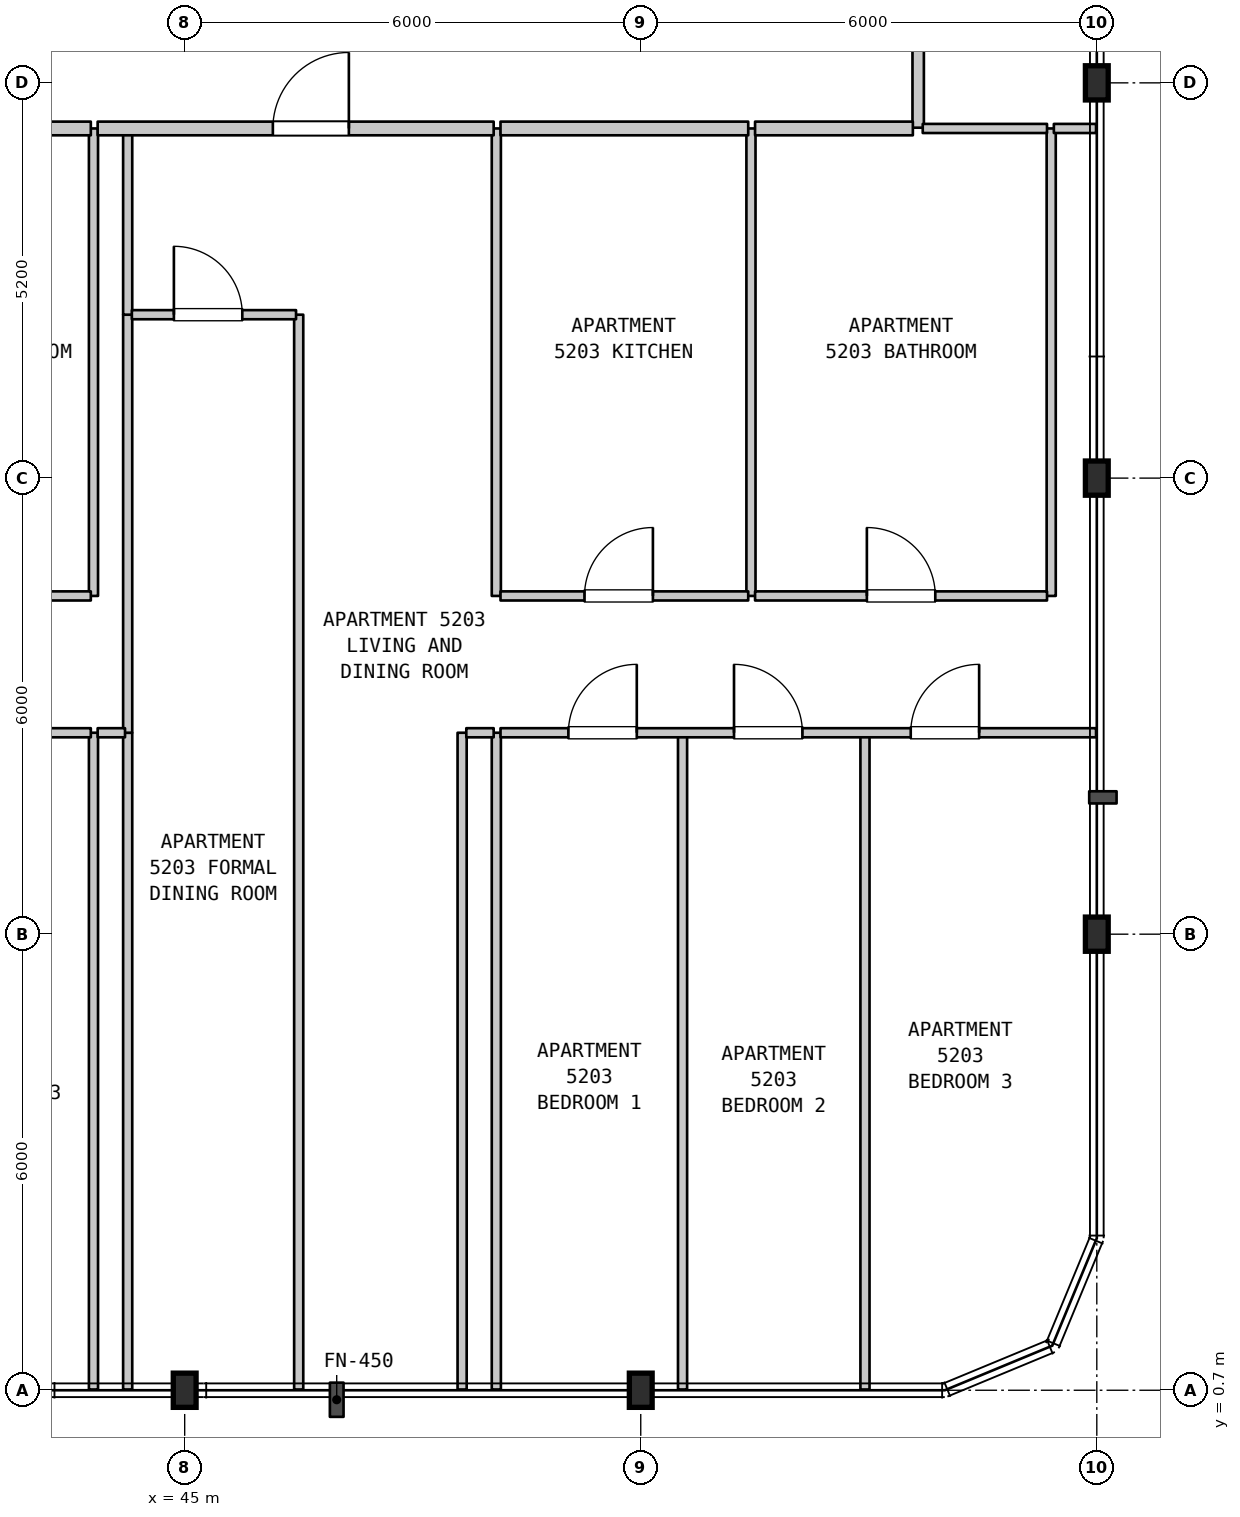
"""IFC4 building model, lengths in metres.
Left out: names, types, materials, properties, quantities, classifications, styles, units other than length and angle.
Written with IfcOpenShell. Run it as: python <this file> out.ifc"""

import sys

from ifc_helpers import new_model, si_unit, direction, frame, frame_2d, origin, origin_2d, place, context, subcontext, project, spatial, rectangle, i_section, extrude, element, fill, save


model = new_model("IFC4")
c1 = context("Model", 3, precision=1e-05, world=origin(), true_north=direction((0.0, 1.0)))
c2 = subcontext(c1, "Body", "Model", "MODEL_VIEW")
j1 = project(units=[si_unit("LENGTHUNIT", "METRE"), si_unit("PLANEANGLEUNIT", "RADIAN")], contexts=[c1])
p1 = place(None, origin())
s1 = spatial("IfcSite", under=j1, at=p1, CompositionType="ELEMENT")
p2 = place(p1, origin())
s2 = spatial("IfcBuilding", under=s1, at=p2, CompositionType="ELEMENT")
p3 = place(p2, frame((0.0, 0.0, 210.6)))
s3 = spatial("IfcBuildingStorey", under=s2, at=p3, CompositionType="ELEMENT", Elevation=210.6)
for number, where, z_axis, x_axis in (
    (1, (45.0, 0.7, 0.0), (0.0, 0.0, 1.0), (1.0, 0.0, 0.0)),
    (2, (51.0, 0.7, 0.0), (0.0, 0.0, 1.0), (1.0, 0.0, 0.0)),
    (3, (57.0, 6.7, 0.0), (0.0, 0.0, 1.0), (1.0, 0.0, 0.0)),
    (4, (57.0, 12.7, 0.0), (0.0, 0.0, 1.0), (1.0, 0.0, 0.0)),
    (5, (57.0, 17.9, 0.0), (0.0, 0.0, 1.0), (1.0, 0.0, 0.0)),
):
    element("IfcColumn", number, at=place(p3, frame(where, z_axis=z_axis, x_axis=x_axis)), inside=s3, PredefinedType="COLUMN", context=c2, shape_type="SweptSolid", body=[
        extrude(i_section(OverallWidth=0.3, OverallDepth=0.45, WebThickness=0.014, FlangeThickness=0.026, FilletRadius=0.027, at=origin_2d()), origin(), (0.0, 0.0, 1.0), 3.7),
    ])
p4 = place(p3, frame((43.8, 0.71, 0.0), z_axis=(0.0, 0.0, 1.0), x_axis=(0.0, 1.0, 0.0)))
e6 = element("IfcWall", 6, at=p4, inside=s3, PredefinedType="PARTITIONING", context=c2, shape_type="SweptSolid", body=[
    extrude(rectangle(XDim=8.64, YDim=0.12, at=frame_2d((4.32, 0.0))), origin(), (0.0, 0.0, 1.0), 3.39),
])
p5 = place(p3, frame((43.8, 11.15, 0.0), z_axis=(0.0, 0.0, 1.0), x_axis=(0.0, 1.0, 0.0)))
e7 = element("IfcWall", 7, at=p5, inside=s3, PredefinedType="PARTITIONING", context=c2, shape_type="SweptSolid", body=[
    extrude(rectangle(XDim=6.15, YDim=0.12, at=frame_2d((3.075, 0.0))), origin(), (0.0, 0.0, 1.0), 3.39),
])
p6 = place(p3, frame((44.25, 0.71, 0.0), z_axis=(0.0, 0.0, 1.0), x_axis=(0.0, 1.0, 0.0)))
e8 = element("IfcWall", 8, at=p6, inside=s3, PredefinedType="PARTITIONING", context=c2, shape_type="SweptSolid", body=[
    extrude(rectangle(XDim=8.64, YDim=0.12, at=frame_2d((4.32, 0.0))), origin(), (0.0, 0.0, 1.0), 3.39),
])
p7 = place(p3, frame((44.25, 9.35, 0.0), z_axis=(0.0, 0.0, 1.0), x_axis=(0.0, 1.0, 0.0)))
e9 = element("IfcWall", 9, at=p7, inside=s3, PredefinedType="PARTITIONING", context=c2, shape_type="SweptSolid", body=[
    extrude(rectangle(XDim=5.5, YDim=0.12, at=frame_2d((2.75, 0.0))), origin(), (0.0, 0.0, 1.0), 3.39),
])
p8 = place(p3, frame((44.25, 14.85, 0.0), z_axis=(0.0, 0.0, 1.0), x_axis=(0.0, 1.0, 0.0)))
e10 = element("IfcWall", 10, at=p8, inside=s3, PredefinedType="PARTITIONING", context=c2, shape_type="SweptSolid", body=[
    extrude(rectangle(XDim=2.45, YDim=0.12, at=frame_2d((1.225, 0.0))), origin(), (0.0, 0.0, 1.0), 3.39),
])
p9 = place(p3, frame((46.5, 0.71, 0.0), z_axis=(0.0, 0.0, 1.0), x_axis=(0.0, 1.0, 0.0)))
e11 = element("IfcWall", 11, at=p9, inside=s3, PredefinedType="PARTITIONING", context=c2, shape_type="SweptSolid", body=[
    extrude(rectangle(XDim=14.14, YDim=0.12, at=frame_2d((7.07, 0.0))), origin(), (0.0, 0.0, 1.0), 3.39),
])
for number, where, z_axis, x_axis in (
    (12, (48.65, 0.71, 0.0), (0.0, 0.0, 1.0), (0.0, 1.0, 0.0)),
    (13, (49.1, 0.71, 0.0), (0.0, 0.0, 1.0), (0.0, 1.0, 0.0)),
):
    element("IfcWall", number, at=place(p3, frame(where, z_axis=z_axis, x_axis=x_axis)), inside=s3, PredefinedType="PARTITIONING", context=c2, shape_type="SweptSolid", body=[
        extrude(rectangle(XDim=8.64, YDim=0.12, at=frame_2d((4.32, 0.0))), origin(), (0.0, 0.0, 1.0), 3.39),
    ])
p10 = place(p3, frame((49.1, 11.15, 0.0), z_axis=(0.0, 0.0, 1.0), x_axis=(0.0, 1.0, 0.0)))
e14 = element("IfcWall", 14, at=p10, inside=s3, PredefinedType="PARTITIONING", context=c2, shape_type="SweptSolid", body=[
    extrude(rectangle(XDim=6.15, YDim=0.12, at=frame_2d((3.075, 0.0))), origin(), (0.0, 0.0, 1.0), 3.39),
])
p11 = place(p3, frame((51.55, 0.71, 0.0), z_axis=(0.0, 0.0, 1.0), x_axis=(0.0, 1.0, 0.0)))
e15 = element("IfcWall", 15, at=p11, inside=s3, PredefinedType="PARTITIONING", context=c2, shape_type="SweptSolid", body=[
    extrude(rectangle(XDim=8.64, YDim=0.12, at=frame_2d((4.32, 0.0))), origin(), (0.0, 0.0, 1.0), 3.39),
])
p12 = place(p3, frame((52.45, 11.15, 0.0), z_axis=(0.0, 0.0, 1.0), x_axis=(0.0, 1.0, 0.0)))
e16 = element("IfcWall", 16, at=p12, inside=s3, PredefinedType="PARTITIONING", context=c2, shape_type="SweptSolid", body=[
    extrude(rectangle(XDim=6.15, YDim=0.12, at=frame_2d((3.075, 0.0))), origin(), (0.0, 0.0, 1.0), 3.39),
])
p13 = place(p3, frame((53.95, 0.71, 0.0), z_axis=(0.0, 0.0, 1.0), x_axis=(0.0, 1.0, 0.0)))
e17 = element("IfcWall", 17, at=p13, inside=s3, PredefinedType="PARTITIONING", context=c2, shape_type="SweptSolid", body=[
    extrude(rectangle(XDim=8.64, YDim=0.12, at=frame_2d((4.32, 0.0))), origin(), (0.0, 0.0, 1.0), 3.39),
])
p14 = place(p3, frame((54.65, 17.31, 0.0), z_axis=(0.0, 0.0, 1.0), x_axis=(0.0, 1.0, 0.0)))
e18 = element("IfcWall", 18, at=p14, inside=s3, PredefinedType="STANDARD", context=c2, shape_type="SweptSolid", body=[
    extrude(rectangle(XDim=2.19, YDim=0.15, at=frame_2d((1.095, 0.0))), origin(), (0.0, 0.0, 1.0), 3.39),
])
p15 = place(p3, frame((56.4, 11.15, 0.0), z_axis=(0.0, 0.0, 1.0), x_axis=(0.0, 1.0, 0.0)))
e19 = element("IfcWall", 19, at=p15, inside=s3, PredefinedType="PARTITIONING", context=c2, shape_type="SweptSolid", body=[
    extrude(rectangle(XDim=6.15, YDim=0.12, at=frame_2d((3.075, 0.0))), origin(), (0.0, 0.0, 1.0), 3.39),
])
p16 = place(p3, frame((34.795, 9.35, 0.0), z_axis=(0.0, 0.0, 1.0), x_axis=(1.0, 0.0, 0.0)))
e20 = element("IfcWall", 20, at=p16, inside=s3, PredefinedType="PARTITIONING", context=c2, shape_type="SweptSolid", body=[
    extrude(rectangle(XDim=8.97, YDim=0.12, at=frame_2d((4.485, 0.0))), origin(), (0.0, 0.0, 1.0), 3.39),
])
p17 = place(p16, frame((1.119, 0.0, 0.0)))
e21 = element("IfcOpeningElement", 21, at=p17, cuts=e20, PredefinedType="OPENING", context=c2, shape_type="SweptSolid", body=[
    extrude(rectangle(XDim=0.9, YDim=2.15, at=frame_2d((0.45, 1.075))), frame((0.0, 0.07, 0.0), z_axis=(0.0, -1.0, 0.0), x_axis=(1.0, 0.0, 0.0)), (0.0, 0.0, 1.0), 0.14),
])
p18 = place(p16, frame((3.962, 0.0, 0.0)))
e22 = element("IfcOpeningElement", 22, at=p18, cuts=e20, PredefinedType="OPENING", context=c2, shape_type="SweptSolid", body=[
    extrude(rectangle(XDim=0.9, YDim=2.15, at=frame_2d((0.45, 1.075))), frame((0.0, 0.07, 0.0), z_axis=(0.0, -1.0, 0.0), x_axis=(1.0, 0.0, 0.0)), (0.0, 0.0, 1.0), 0.14),
])
p19 = place(p16, frame((6.809, 0.0, 0.0)))
e23 = element("IfcOpeningElement", 23, at=p19, cuts=e20, PredefinedType="OPENING", context=c2, shape_type="SweptSolid", body=[
    extrude(rectangle(XDim=0.9, YDim=2.15, at=frame_2d((0.45, 1.075))), frame((0.0, 0.07, 0.0), z_axis=(0.0, -1.0, 0.0), x_axis=(1.0, 0.0, 0.0)), (0.0, 0.0, 1.0), 0.14),
])
p20 = place(p3, frame((43.855, 9.35, 0.0), z_axis=(0.0, 0.0, 1.0), x_axis=(1.0, 0.0, 0.0)))
e24 = element("IfcWall", 24, at=p20, inside=s3, PredefinedType="PARTITIONING", context=c2, shape_type="SweptSolid", body=[
    extrude(rectangle(XDim=0.36, YDim=0.12, at=frame_2d((0.18, 0.0))), origin(), (0.0, 0.0, 1.0), 3.39),
])
p21 = place(p3, frame((48.705, 9.35, 0.0), z_axis=(0.0, 0.0, 1.0), x_axis=(1.0, 0.0, 0.0)))
e25 = element("IfcWall", 25, at=p21, inside=s3, PredefinedType="PARTITIONING", context=c2, shape_type="SweptSolid", body=[
    extrude(rectangle(XDim=0.36, YDim=0.12, at=frame_2d((0.18, 0.0))), origin(), (0.0, 0.0, 1.0), 3.39),
])
p22 = place(p3, frame((49.155, 9.35, 0.0), z_axis=(0.0, 0.0, 1.0), x_axis=(1.0, 0.0, 0.0)))
e26 = element("IfcWall", 26, at=p22, inside=s3, PredefinedType="PARTITIONING", context=c2, shape_type="SweptSolid", body=[
    extrude(rectangle(XDim=7.835, YDim=0.12, at=frame_2d((3.917, 0.0))), origin(), (0.0, 0.0, 1.0), 3.39),
])
p23 = place(p22, frame((0.893, 0.0, 0.0)))
e27 = element("IfcOpeningElement", 27, at=p23, cuts=e26, PredefinedType="OPENING", context=c2, shape_type="SweptSolid", body=[
    extrude(rectangle(XDim=0.9, YDim=2.15, at=frame_2d((0.45, 1.075))), frame((0.0, 0.07, 0.0), z_axis=(0.0, -1.0, 0.0), x_axis=(1.0, 0.0, 0.0)), (0.0, 0.0, 1.0), 0.14),
])
p24 = place(p22, frame((3.072, 0.0, 0.0)))
e28 = element("IfcOpeningElement", 28, at=p24, cuts=e26, PredefinedType="OPENING", context=c2, shape_type="SweptSolid", body=[
    extrude(rectangle(XDim=0.9, YDim=2.15, at=frame_2d((0.45, 1.075))), frame((0.0, 0.07, 0.0), z_axis=(0.0, -1.0, 0.0), x_axis=(1.0, 0.0, 0.0)), (0.0, 0.0, 1.0), 0.14),
])
p25 = place(p22, frame((5.397, 0.0, 0.0)))
e29 = element("IfcOpeningElement", 29, at=p25, cuts=e26, PredefinedType="OPENING", context=c2, shape_type="SweptSolid", body=[
    extrude(rectangle(XDim=0.9, YDim=2.15, at=frame_2d((0.45, 1.075))), frame((0.0, 0.07, 0.0), z_axis=(0.0, -1.0, 0.0), x_axis=(1.0, 0.0, 0.0)), (0.0, 0.0, 1.0), 0.14),
])
p26 = place(p3, frame((41.318, 11.15, 0.0), z_axis=(0.0, 0.0, 1.0), x_axis=(1.0, 0.0, 0.0)))
e30 = element("IfcWall", 30, at=p26, inside=s3, PredefinedType="PARTITIONING", context=c2, shape_type="SweptSolid", body=[
    extrude(rectangle(XDim=2.447, YDim=0.12, at=frame_2d((1.223, 0.0))), origin(), (0.0, 0.0, 1.0), 3.39),
])
p27 = place(p26, frame((0.774, 0.0, 0.0)))
e31 = element("IfcOpeningElement", 31, at=p27, cuts=e30, PredefinedType="OPENING", context=c2, shape_type="SweptSolid", body=[
    extrude(rectangle(XDim=0.9, YDim=2.1, at=frame_2d((0.45, 1.05))), frame((0.0, 0.07, 0.0), z_axis=(0.0, -1.0, 0.0), x_axis=(1.0, 0.0, 0.0)), (0.0, 0.0, 1.0), 0.14),
])
p28 = place(p3, frame((49.155, 11.15, 0.0), z_axis=(0.0, 0.0, 1.0), x_axis=(1.0, 0.0, 0.0)))
e32 = element("IfcWall", 32, at=p28, inside=s3, PredefinedType="PARTITIONING", context=c2, shape_type="SweptSolid", body=[
    extrude(rectangle(XDim=3.259, YDim=0.12, at=frame_2d((1.629, 0.0))), origin(), (0.0, 0.0, 1.0), 3.39),
])
p29 = place(p28, frame((1.105, 0.0, 0.0)))
e33 = element("IfcOpeningElement", 33, at=p29, cuts=e32, PredefinedType="OPENING", context=c2, shape_type="SweptSolid", body=[
    extrude(rectangle(XDim=0.9, YDim=2.15, at=frame_2d((0.45, 1.075))), frame((0.0, 0.07, 0.0), z_axis=(0.0, -1.0, 0.0), x_axis=(1.0, 0.0, 0.0)), (0.0, 0.0, 1.0), 0.14),
])
p30 = place(p3, frame((52.504, 11.15, 0.0), z_axis=(0.0, 0.0, 1.0), x_axis=(1.0, 0.0, 0.0)))
e34 = element("IfcWall", 34, at=p30, inside=s3, PredefinedType="PARTITIONING", context=c2, shape_type="SweptSolid", body=[
    extrude(rectangle(XDim=3.841, YDim=0.12, at=frame_2d((1.92, 0.0))), origin(), (0.0, 0.0, 1.0), 3.39),
])
p31 = place(p30, frame((1.471, 0.0, 0.0)))
e35 = element("IfcOpeningElement", 35, at=p31, cuts=e34, PredefinedType="OPENING", context=c2, shape_type="SweptSolid", body=[
    extrude(rectangle(XDim=0.9, YDim=2.1, at=frame_2d((0.45, 1.05))), frame((0.0, 0.07, 0.0), z_axis=(0.0, -1.0, 0.0), x_axis=(1.0, 0.0, 0.0)), (0.0, 0.0, 1.0), 0.14),
])
p32 = place(p3, frame((44.305, 14.85, 0.0), z_axis=(0.0, 0.0, 1.0), x_axis=(1.0, 0.0, 0.0)))
e36 = element("IfcWall", 36, at=p32, inside=s3, PredefinedType="PARTITIONING", context=c2, shape_type="SweptSolid", body=[
    extrude(rectangle(XDim=2.16, YDim=0.12, at=frame_2d((1.08, 0.0))), origin(), (0.0, 0.0, 1.0), 3.39),
])
p33 = place(p32, frame((0.553, 0.0, 0.0)))
e37 = element("IfcOpeningElement", 37, at=p33, cuts=e36, PredefinedType="OPENING", context=c2, shape_type="SweptSolid", body=[
    extrude(rectangle(XDim=0.9, YDim=2.15, at=frame_2d((0.45, 1.075))), frame((0.0, 0.07, 0.0), z_axis=(0.0, -1.0, 0.0), x_axis=(1.0, 0.0, 0.0)), (0.0, 0.0, 1.0), 0.14),
])
p34 = place(p3, frame((41.318, 17.3, 0.0), z_axis=(0.0, 0.0, 1.0), x_axis=(1.0, 0.0, 0.0)))
e38 = element("IfcWall", 38, at=p34, inside=s3, PredefinedType="STANDARD", context=c2, shape_type="SweptSolid", body=[
    extrude(rectangle(XDim=2.447, YDim=0.18, at=frame_2d((1.223, 0.0))), origin(), (0.0, 0.0, 1.0), 3.39),
])
p35 = place(p3, frame((43.855, 17.3, 0.0), z_axis=(0.0, 0.0, 1.0), x_axis=(1.0, 0.0, 0.0)))
e39 = element("IfcWall", 39, at=p35, inside=s3, PredefinedType="STANDARD", context=c2, shape_type="SweptSolid", body=[
    extrude(rectangle(XDim=5.21, YDim=0.18, at=frame_2d((2.605, 0.0))), origin(), (0.0, 0.0, 1.0), 3.39),
])
p36 = place(p35, frame((2.305, 0.0, 0.0)))
e40 = element("IfcOpeningElement", 40, at=p36, cuts=e39, PredefinedType="OPENING", context=c2, shape_type="SweptSolid", body=[
    extrude(rectangle(XDim=1.0, YDim=2.15, at=frame_2d((0.5, 1.075))), frame((0.0, 0.1, 0.0), z_axis=(0.0, -1.0, 0.0), x_axis=(1.0, 0.0, 0.0)), (0.0, 0.0, 1.0), 0.2),
])
p37 = place(p3, frame((49.155, 17.3, 0.0), z_axis=(0.0, 0.0, 1.0), x_axis=(1.0, 0.0, 0.0)))
e41 = element("IfcWall", 41, at=p37, inside=s3, PredefinedType="STANDARD", context=c2, shape_type="SweptSolid", body=[
    extrude(rectangle(XDim=3.259, YDim=0.18, at=frame_2d((1.629, 0.0))), origin(), (0.0, 0.0, 1.0), 3.39),
])
p38 = place(p3, frame((52.504, 17.3, 0.0), z_axis=(0.0, 0.0, 1.0), x_axis=(1.0, 0.0, 0.0)))
e42 = element("IfcWall", 42, at=p38, inside=s3, PredefinedType="STANDARD", context=c2, shape_type="SweptSolid", body=[
    extrude(rectangle(XDim=2.076, YDim=0.18, at=frame_2d((1.038, 0.0))), origin(), (0.0, 0.0, 1.0), 3.39),
])
p39 = place(p3, frame((54.71, 17.3, 0.0), z_axis=(0.0, 0.0, 1.0), x_axis=(1.0, 0.0, 0.0)))
e43 = element("IfcWall", 43, at=p39, inside=s3, PredefinedType="PARTITIONING", context=c2, shape_type="SweptSolid", body=[
    extrude(rectangle(XDim=1.635, YDim=0.12, at=frame_2d((0.817, 0.0))), origin(), (0.0, 0.0, 1.0), 3.39),
])
p40 = place(p3, frame((56.435, 17.3, 0.0), z_axis=(0.0, 0.0, 1.0), x_axis=(1.0, 0.0, 0.0)))
e44 = element("IfcWall", 44, at=p40, inside=s3, PredefinedType="PARTITIONING", context=c2, shape_type="SweptSolid", body=[
    extrude(rectangle(XDim=0.555, YDim=0.12, at=frame_2d((0.277, 0.0))), origin(), (0.0, 0.0, 1.0), 3.39),
])
p41 = place(p23, origin())
e45 = element("IfcDoor", 45, at=p41, inside=s3, OperationType="SINGLE_SWING_RIGHT", PredefinedType="DOOR", context=c2, shape_type="SweptSolid", body=[
    extrude(rectangle(XDim=0.9, YDim=2.15, at=frame_2d((0.45, 1.075))), frame((0.0, 0.025, 0.0), z_axis=(0.0, -1.0, 0.0), x_axis=(1.0, 0.0, 0.0)), (0.0, 0.0, 1.0), 0.05),
])
fill(e27, e45)
p42 = place(p24, origin())
e46 = element("IfcDoor", 46, at=p42, inside=s3, OperationType="SINGLE_SWING_LEFT", PredefinedType="DOOR", context=c2, shape_type="SweptSolid", body=[
    extrude(rectangle(XDim=0.9, YDim=2.15, at=frame_2d((0.45, 1.075))), frame((0.0, 0.025, 0.0), z_axis=(0.0, -1.0, 0.0), x_axis=(1.0, 0.0, 0.0)), (0.0, 0.0, 1.0), 0.05),
])
fill(e28, e46)
p43 = place(p25, origin())
e47 = element("IfcDoor", 47, at=p43, inside=s3, OperationType="SINGLE_SWING_RIGHT", PredefinedType="DOOR", context=c2, shape_type="SweptSolid", body=[
    extrude(rectangle(XDim=0.9, YDim=2.15, at=frame_2d((0.45, 1.075))), frame((0.0, 0.025, 0.0), z_axis=(0.0, -1.0, 0.0), x_axis=(1.0, 0.0, 0.0)), (0.0, 0.0, 1.0), 0.05),
])
fill(e29, e47)
p44 = place(p29, origin())
e48 = element("IfcDoor", 48, at=p44, inside=s3, OperationType="SINGLE_SWING_RIGHT", PredefinedType="DOOR", context=c2, shape_type="SweptSolid", body=[
    extrude(rectangle(XDim=0.9, YDim=2.15, at=frame_2d((0.45, 1.075))), frame((0.0, 0.025, 0.0), z_axis=(0.0, -1.0, 0.0), x_axis=(1.0, 0.0, 0.0)), (0.0, 0.0, 1.0), 0.05),
])
fill(e33, e48)
p45 = place(p31, origin())
e49 = element("IfcDoor", 49, at=p45, inside=s3, OperationType="SINGLE_SWING_LEFT", PredefinedType="DOOR", context=c2, shape_type="SweptSolid", body=[
    extrude(rectangle(XDim=0.9, YDim=2.1, at=frame_2d((0.45, 1.05))), frame((0.0, 0.025, 0.0), z_axis=(0.0, -1.0, 0.0), x_axis=(1.0, 0.0, 0.0)), (0.0, 0.0, 1.0), 0.05),
])
fill(e35, e49)
p46 = place(p33, origin())
e50 = element("IfcDoor", 50, at=p46, inside=s3, OperationType="SINGLE_SWING_LEFT", PredefinedType="DOOR", context=c2, shape_type="SweptSolid", body=[
    extrude(rectangle(XDim=0.9, YDim=2.15, at=frame_2d((0.45, 1.075))), frame((0.0, 0.025, 0.0), z_axis=(0.0, -1.0, 0.0), x_axis=(1.0, 0.0, 0.0)), (0.0, 0.0, 1.0), 0.05),
])
fill(e37, e50)
p47 = place(p36, origin())
e51 = element("IfcDoor", 51, at=p47, inside=s3, OperationType="SINGLE_SWING_RIGHT", PredefinedType="DOOR", context=c2, shape_type="SweptSolid", body=[
    extrude(rectangle(XDim=1.0, YDim=2.15, at=frame_2d((0.5, 1.075))), frame((0.0, 0.025, 0.0), z_axis=(0.0, -1.0, 0.0), x_axis=(1.0, 0.0, 0.0)), (0.0, 0.0, 1.0), 0.05),
])
fill(e40, e51)
save(model, sys.argv[1])
